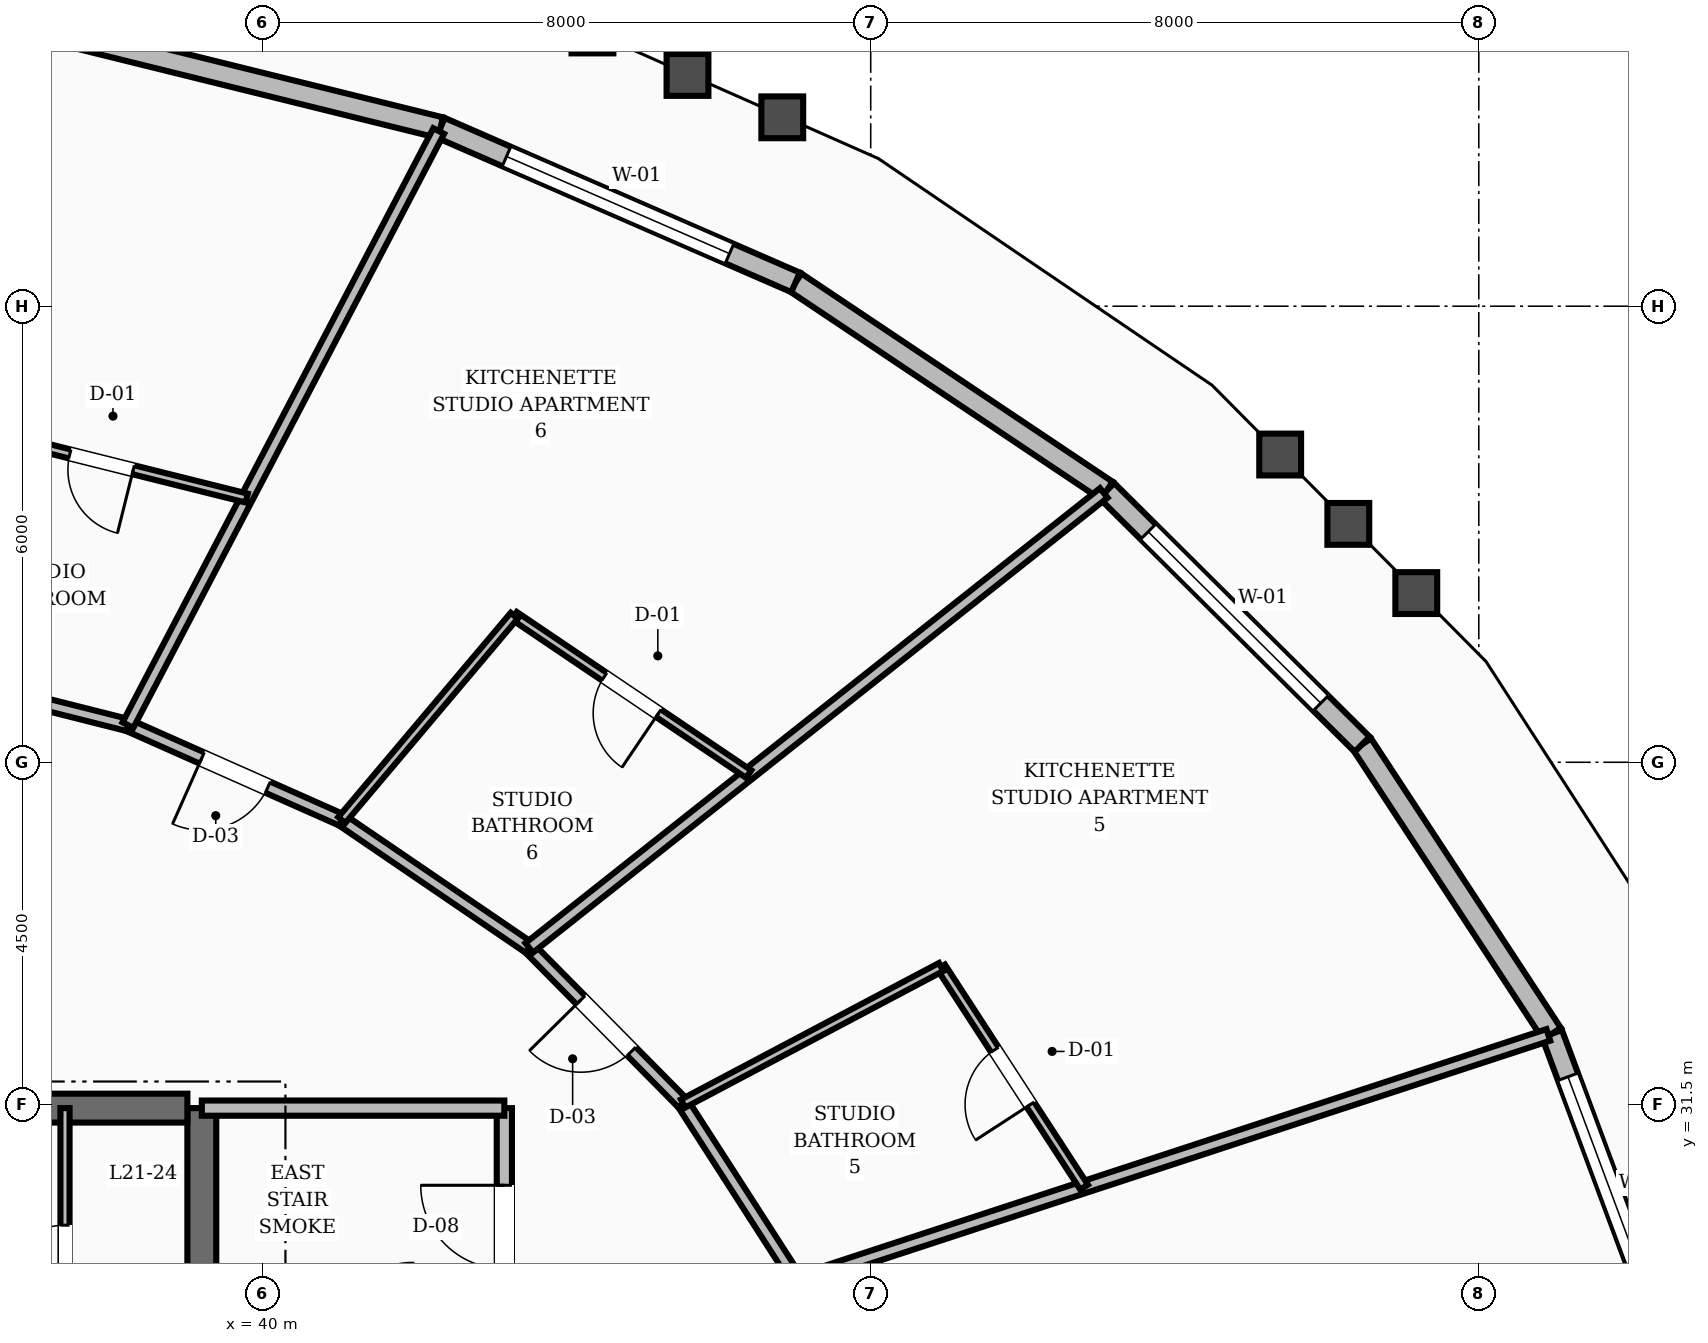
"""IFC4 building model, lengths in metres.
Left out: names, types, materials, properties, quantities, classifications, styles, units other than length and angle.
Written with IfcOpenShell. Run it as: python <this file> out.ifc"""

import sys

from ifc_helpers import new_model, si_unit, direction, frame, frame_2d, origin, place, context, subcontext, project, spatial, rectangle, extrude, element, fill, save


model = new_model("IFC4")
c1 = context("Model", 3, precision=1e-05, world=origin(), true_north=direction((0.0, 1.0)))
c2 = subcontext(c1, "Body", "Model", "MODEL_VIEW")
j1 = project(units=[si_unit("LENGTHUNIT", "METRE"), si_unit("PLANEANGLEUNIT", "RADIAN")], contexts=[c1])
p1 = place(None, origin())
s1 = spatial("IfcSite", under=j1, at=p1, CompositionType="ELEMENT")
p2 = place(p1, origin())
s2 = spatial("IfcBuilding", under=s1, at=p2, CompositionType="ELEMENT")
p3 = place(p2, frame((0.0, 0.0, 84.4)))
s3 = spatial("IfcBuildingStorey", under=s2, at=p3, CompositionType="ELEMENT", Elevation=84.4)
p4 = place(p3, frame((39.2, 25.15, 0.0), z_axis=(0.0, 0.0, 1.0), x_axis=(0.0, 1.0, 0.0)))
e1 = element("IfcWall", 1, at=p4, inside=s3, PredefinedType="SHEAR", context=c2, shape_type="SweptSolid", body=[
    extrude(rectangle(XDim=6.3, YDim=0.38, at=frame_2d((3.15, 0.0))), origin(), (0.0, 0.0, 1.0), 3.6),
])
p5 = place(p3, frame((35.8, 31.45, 0.0), z_axis=(0.0, 0.0, 1.0), x_axis=(1.0, 0.0, 0.0)))
e2 = element("IfcWall", 2, at=p5, inside=s3, PredefinedType="SHEAR", context=c2, shape_type="SweptSolid", body=[
    extrude(rectangle(XDim=3.21, YDim=0.38, at=frame_2d((1.605, 0.0))), origin(), (0.0, 0.0, 1.0), 3.6),
])
p6 = place(p5, frame((0.3, 0.0, 0.0)))
e3 = element("IfcOpeningElement", 3, at=p6, cuts=e2, PredefinedType="OPENING", context=c2, shape_type="SweptSolid", body=[
    extrude(rectangle(XDim=1.1, YDim=2.1, at=frame_2d((0.55, 1.05))), frame((0.0, 0.2, 0.0), z_axis=(0.0, -1.0, 0.0), x_axis=(1.0, 0.0, 0.0)), (0.0, 0.0, 1.0), 0.4),
])
p7 = place(p3, frame((58.5, 28.297, 0.0), z_axis=(0.0, 0.0, 1.0), x_axis=(-0.348719005739, 0.937227323031, 0.0)))
e4 = element("IfcWall", 4, at=p7, inside=s3, PredefinedType="STANDARD", context=c2, shape_type="SweptSolid", body=[
    extrude(rectangle(XDim=4.409, YDim=0.28, at=frame_2d((2.204, 0.0))), origin(), (0.0, 0.0, 1.0), 2.71),
])
p8 = place(p7, frame((0.604, 0.0, 0.8)))
e5 = element("IfcOpeningElement", 5, at=p8, cuts=e4, PredefinedType="OPENING", context=c2, shape_type="SweptSolid", body=[
    extrude(rectangle(XDim=3.2, YDim=1.65, at=frame_2d((1.6, 0.825))), frame((0.0, 0.15, 0.0), z_axis=(0.0, -1.0, 0.0), x_axis=(1.0, 0.0, 0.0)), (0.0, 0.0, 1.0), 0.3),
])
p9 = place(p3, frame((56.962, 32.429, 0.0), z_axis=(0.0, 0.0, 1.0), x_axis=(-0.548336678248, 0.836257668, 0.0)))
e6 = element("IfcWall", 6, at=p9, inside=s3, PredefinedType="STANDARD", context=c2, shape_type="SweptSolid", body=[
    extrude(rectangle(XDim=4.553, YDim=0.28, at=frame_2d((2.277, 0.0))), origin(), (0.0, 0.0, 1.0), 2.71),
])
p10 = place(p3, frame((54.466, 36.237, 0.0), z_axis=(0.0, 0.0, 1.0), x_axis=(-0.709499676925, 0.704705760189, 0.0)))
e7 = element("IfcWall", 7, at=p10, inside=s3, PredefinedType="STANDARD", context=c2, shape_type="SweptSolid", body=[
    extrude(rectangle(XDim=4.736, YDim=0.28, at=frame_2d((2.368, 0.0))), origin(), (0.0, 0.0, 1.0), 2.71),
])
p11 = place(p10, frame((0.768, 0.0, 0.8)))
e8 = element("IfcOpeningElement", 8, at=p11, cuts=e7, PredefinedType="OPENING", context=c2, shape_type="SweptSolid", body=[
    extrude(rectangle(XDim=3.2, YDim=1.65, at=frame_2d((1.6, 0.825))), frame((0.0, 0.15, 0.0), z_axis=(0.0, -1.0, 0.0), x_axis=(1.0, 0.0, 0.0)), (0.0, 0.0, 1.0), 0.3),
])
p12 = place(p3, frame((51.105, 39.574, 0.0), z_axis=(0.0, 0.0, 1.0), x_axis=(-0.831134194268, 0.55607189384, 0.0)))
e9 = element("IfcWall", 9, at=p12, inside=s3, PredefinedType="STANDARD", context=c2, shape_type="SweptSolid", body=[
    extrude(rectangle(XDim=4.926, YDim=0.28, at=frame_2d((2.463, 0.0))), origin(), (0.0, 0.0, 1.0), 2.71),
])
p13 = place(p3, frame((47.011, 42.313, 0.0), z_axis=(0.0, 0.0, 1.0), x_axis=(-0.916774249717, 0.399405777445, 0.0)))
e10 = element("IfcWall", 10, at=p13, inside=s3, PredefinedType="STANDARD", context=c2, shape_type="SweptSolid", body=[
    extrude(rectangle(XDim=5.095, YDim=0.28, at=frame_2d((2.548, 0.0))), origin(), (0.0, 0.0, 1.0), 2.71),
])
p14 = place(p13, frame((0.948, 0.0, 0.8)))
e11 = element("IfcOpeningElement", 11, at=p14, cuts=e10, PredefinedType="OPENING", context=c2, shape_type="SweptSolid", body=[
    extrude(rectangle(XDim=3.2, YDim=1.65, at=frame_2d((1.6, 0.825))), frame((0.0, 0.15, 0.0), z_axis=(0.0, -1.0, 0.0), x_axis=(1.0, 0.0, 0.0)), (0.0, 0.0, 1.0), 0.3),
])
p15 = place(p3, frame((42.34, 44.349, 0.0), z_axis=(0.0, 0.0, 1.0), x_axis=(-0.970758207565, 0.240059372749, 0.0)))
e12 = element("IfcWall", 12, at=p15, inside=s3, PredefinedType="STANDARD", context=c2, shape_type="SweptSolid", body=[
    extrude(rectangle(XDim=5.221, YDim=0.28, at=frame_2d((2.611, 0.0))), origin(), (0.0, 0.0, 1.0), 2.71),
])
p16 = place(p3, frame((43.18, 28.32, 0.0), z_axis=(0.0, 0.0, 1.0), x_axis=(0.0, 1.0, 0.0)))
e13 = element("IfcWall", 13, at=p16, inside=s3, PredefinedType="SOLIDWALL", context=c2, shape_type="SweptSolid", body=[
    extrude(rectangle(XDim=3.13, YDim=0.2, at=frame_2d((1.565, 0.0))), origin(), (0.0, 0.0, 1.0), 2.71),
])
p17 = place(p16, frame((1.015, 0.0, 0.0)))
e14 = element("IfcOpeningElement", 14, at=p17, cuts=e13, PredefinedType="OPENING", context=c2, shape_type="SweptSolid", body=[
    extrude(rectangle(XDim=1.1, YDim=2.1, at=frame_2d((0.55, 1.05))), frame((0.0, 0.11, 0.0), z_axis=(0.0, -1.0, 0.0), x_axis=(1.0, 0.0, 0.0)), (0.0, 0.0, 1.0), 0.22),
])
p18 = place(p3, frame((39.2, 31.45, 0.0), z_axis=(0.0, 0.0, 1.0), x_axis=(1.0, 0.0, 0.0)))
e15 = element("IfcWall", 15, at=p18, inside=s3, PredefinedType="SOLIDWALL", context=c2, shape_type="SweptSolid", body=[
    extrude(rectangle(XDim=3.98, YDim=0.2, at=frame_2d((1.99, 0.0))), origin(), (0.0, 0.0, 1.0), 2.71),
])
p19 = place(p3, frame((37.4, 25.25, 0.0), z_axis=(0.0, 0.0, 1.0), x_axis=(0.0, 1.0, 0.0)))
e16 = element("IfcWall", 16, at=p19, inside=s3, PredefinedType="PARTITIONING", context=c2, shape_type="SweptSolid", body=[
    extrude(rectangle(XDim=6.2, YDim=0.12, at=frame_2d((3.1, 0.0))), origin(), (0.0, 0.0, 1.0), 2.71),
])
p20 = place(p19, frame((0.8, 0.0, 0.0)))
e17 = element("IfcOpeningElement", 17, at=p20, cuts=e16, PredefinedType="OPENING", context=c2, shape_type="SweptSolid", body=[
    extrude(rectangle(XDim=0.86, YDim=2.1, at=frame_2d((0.43, 1.05))), frame((0.0, 0.07, 0.0), z_axis=(0.0, -1.0, 0.0), x_axis=(1.0, 0.0, 0.0)), (0.0, 0.0, 1.0), 0.14),
])
p21 = place(p19, frame((3.8, 0.0, 0.0)))
e18 = element("IfcOpeningElement", 18, at=p21, cuts=e16, PredefinedType="OPENING", context=c2, shape_type="SweptSolid", body=[
    extrude(rectangle(XDim=0.86, YDim=2.1, at=frame_2d((0.43, 1.05))), frame((0.0, 0.07, 0.0), z_axis=(0.0, -1.0, 0.0), x_axis=(1.0, 0.0, 0.0)), (0.0, 0.0, 1.0), 0.14),
])
p22 = place(p3, frame((47.035, 29.173, 0.0), z_axis=(0.0, 0.0, 1.0), x_axis=(-0.541126045017, 0.840941498206, 0.0)))
e19 = element("IfcWall", 19, at=p22, inside=s3, PredefinedType="SOLIDWALL", context=c2, shape_type="SweptSolid", body=[
    extrude(rectangle(XDim=2.779, YDim=0.16, at=frame_2d((1.39, 0.0))), origin(), (0.0, 0.0, 1.0), 2.71),
])
p23 = place(p3, frame((45.531, 31.51, 0.0), z_axis=(0.0, 0.0, 1.0), x_axis=(-0.702811997, 0.711375636969, 0.0)))
e20 = element("IfcWall", 20, at=p23, inside=s3, PredefinedType="SOLIDWALL", context=c2, shape_type="SweptSolid", body=[
    extrude(rectangle(XDim=2.879, YDim=0.16, at=frame_2d((1.44, 0.0))), origin(), (0.0, 0.0, 1.0), 2.71),
])
p24 = place(p23, frame((0.965, 0.0, 0.0)))
e21 = element("IfcOpeningElement", 21, at=p24, cuts=e20, PredefinedType="OPENING", context=c2, shape_type="SweptSolid", body=[
    extrude(rectangle(XDim=0.95, YDim=2.1, at=frame_2d((0.475, 1.05))), frame((0.0, 0.09, 0.0), z_axis=(0.0, -1.0, 0.0), x_axis=(1.0, 0.0, 0.0)), (0.0, 0.0, 1.0), 0.18),
])
p25 = place(p3, frame((43.508, 33.559, 0.0), z_axis=(0.0, 0.0, 1.0), x_axis=(-0.826293096206, 0.56324037423, 0.0)))
e22 = element("IfcWall", 22, at=p25, inside=s3, PredefinedType="SOLIDWALL", context=c2, shape_type="SweptSolid", body=[
    extrude(rectangle(XDim=2.985, YDim=0.16, at=frame_2d((1.492, 0.0))), origin(), (0.0, 0.0, 1.0), 2.71),
])
p26 = place(p3, frame((41.041, 35.24, 0.0), z_axis=(0.0, 0.0, 1.0), x_axis=(-0.913952123493, 0.405822024984, 0.0)))
e23 = element("IfcWall", 23, at=p26, inside=s3, PredefinedType="SOLIDWALL", context=c2, shape_type="SweptSolid", body=[
    extrude(rectangle(XDim=3.078, YDim=0.16, at=frame_2d((1.539, 0.0))), origin(), (0.0, 0.0, 1.0), 2.71),
])
p27 = place(p26, frame((1.064, 0.0, 0.0)))
e24 = element("IfcOpeningElement", 24, at=p27, cuts=e23, PredefinedType="OPENING", context=c2, shape_type="SweptSolid", body=[
    extrude(rectangle(XDim=0.95, YDim=2.1, at=frame_2d((0.475, 1.05))), frame((0.0, 0.09, 0.0), z_axis=(0.0, -1.0, 0.0), x_axis=(1.0, 0.0, 0.0)), (0.0, 0.0, 1.0), 0.18),
])
p28 = place(p3, frame((38.228, 36.489, 0.0), z_axis=(0.0, 0.0, 1.0), x_axis=(-0.969689238064, 0.244341526521, 0.0)))
e25 = element("IfcWall", 25, at=p28, inside=s3, PredefinedType="SOLIDWALL", context=c2, shape_type="SweptSolid", body=[
    extrude(rectangle(XDim=3.148, YDim=0.16, at=frame_2d((1.574, 0.0))), origin(), (0.0, 0.0, 1.0), 2.71),
])
p29 = place(p3, frame((47.035, 29.173, 0.0), z_axis=(0.0, 0.0, 1.0), x_axis=(0.95020777267, 0.311617054664, 0.0)))
e26 = element("IfcWall", 26, at=p29, inside=s3, PredefinedType="SOLIDWALL", context=c2, shape_type="SweptSolid", body=[
    extrude(rectangle(XDim=10.397, YDim=0.16, at=frame_2d((5.199, 0.0))), origin(), (0.0, 0.0, 1.0), 2.71),
])
p30 = place(p3, frame((50.808, 30.41, 0.0), z_axis=(0.0, 0.0, 1.0), x_axis=(-0.544774633125, 0.838582493917, 0.0)))
e27 = element("IfcWall", 27, at=p30, inside=s3, PredefinedType="PARTITIONING", context=c2, shape_type="SweptSolid", body=[
    extrude(rectangle(XDim=3.453, YDim=0.12, at=frame_2d((1.727, 0.0))), origin(), (0.0, 0.0, 1.0), 2.71),
])
p31 = place(p30, frame((1.297, 0.0, 0.0)))
e28 = element("IfcOpeningElement", 28, at=p31, cuts=e27, PredefinedType="OPENING", context=c2, shape_type="SweptSolid", body=[
    extrude(rectangle(XDim=0.86, YDim=2.1, at=frame_2d((0.43, 1.05))), frame((0.0, 0.07, 0.0), z_axis=(0.0, -1.0, 0.0), x_axis=(1.0, 0.0, 0.0)), (0.0, 0.0, 1.0), 0.14),
])
p32 = place(p3, frame((45.531, 31.51, 0.0), z_axis=(0.0, 0.0, 1.0), x_axis=(0.883945577966, 0.467589793723, 0.0)))
e29 = element("IfcWall", 29, at=p32, inside=s3, PredefinedType="PARTITIONING", context=c2, shape_type="SweptSolid", body=[
    extrude(rectangle(XDim=3.841, YDim=0.12, at=frame_2d((1.92, 0.0))), origin(), (0.0, 0.0, 1.0), 2.71),
])
p33 = place(p3, frame((43.508, 33.559, 0.0), z_axis=(0.0, 0.0, 1.0), x_axis=(0.784008851618, 0.620749644047, 0.0)))
e30 = element("IfcWall", 30, at=p33, inside=s3, PredefinedType="SOLIDWALL", context=c2, shape_type="SweptSolid", body=[
    extrude(rectangle(XDim=9.641, YDim=0.16, at=frame_2d((4.82, 0.0))), origin(), (0.0, 0.0, 1.0), 2.71),
])
p34 = place(p3, frame((46.395, 35.844, 0.0), z_axis=(0.0, 0.0, 1.0), x_axis=(-0.82873612878, 0.559639552618, 0.0)))
e31 = element("IfcWall", 31, at=p34, inside=s3, PredefinedType="PARTITIONING", context=c2, shape_type="SweptSolid", body=[
    extrude(rectangle(XDim=3.722, YDim=0.12, at=frame_2d((1.861, 0.0))), origin(), (0.0, 0.0, 1.0), 2.71),
])
p35 = place(p34, frame((1.431, 0.0, 0.0)))
e32 = element("IfcOpeningElement", 32, at=p35, cuts=e31, PredefinedType="OPENING", context=c2, shape_type="SweptSolid", body=[
    extrude(rectangle(XDim=0.86, YDim=2.1, at=frame_2d((0.43, 1.05))), frame((0.0, 0.07, 0.0), z_axis=(0.0, -1.0, 0.0), x_axis=(1.0, 0.0, 0.0)), (0.0, 0.0, 1.0), 0.14),
])
p36 = place(p3, frame((41.041, 35.24, 0.0), z_axis=(0.0, 0.0, 1.0), x_axis=(0.644964696284, 0.764212366131, 0.0)))
e33 = element("IfcWall", 33, at=p36, inside=s3, PredefinedType="PARTITIONING", context=c2, shape_type="SweptSolid", body=[
    extrude(rectangle(XDim=3.517, YDim=0.12, at=frame_2d((1.759, 0.0))), origin(), (0.0, 0.0, 1.0), 2.71),
])
p37 = place(p3, frame((38.228, 36.489, 0.0), z_axis=(0.0, 0.0, 1.0), x_axis=(0.463546676058, 0.886072502178, 0.0)))
e34 = element("IfcWall", 34, at=p37, inside=s3, PredefinedType="SOLIDWALL", context=c2, shape_type="SweptSolid", body=[
    extrude(rectangle(XDim=8.82, YDim=0.16, at=frame_2d((4.41, 0.0))), origin(), (0.0, 0.0, 1.0), 2.71),
])
p38 = place(p3, frame((39.79, 39.476, 0.0), z_axis=(0.0, 0.0, 1.0), x_axis=(-0.970222716949, 0.242214532009, 0.0)))
e35 = element("IfcWall", 35, at=p38, inside=s3, PredefinedType="PARTITIONING", context=c2, shape_type="SweptSolid", body=[
    extrude(rectangle(XDim=3.936, YDim=0.12, at=frame_2d((1.968, 0.0))), origin(), (0.0, 0.0, 1.0), 2.71),
])
p39 = place(p38, frame((1.538, 0.0, 0.0)))
e36 = element("IfcOpeningElement", 36, at=p39, cuts=e35, PredefinedType="OPENING", context=c2, shape_type="SweptSolid", body=[
    extrude(rectangle(XDim=0.86, YDim=2.1, at=frame_2d((0.43, 1.05))), frame((0.0, 0.07, 0.0), z_axis=(0.0, -1.0, 0.0), x_axis=(1.0, 0.0, 0.0)), (0.0, 0.0, 1.0), 0.14),
])
p40 = place(p8, origin())
e37 = element("IfcWindow", 37, at=p40, inside=s3, PartitioningType="SINGLE_PANEL", PredefinedType="WINDOW", context=c2, shape_type="SweptSolid", body=[
    extrude(rectangle(XDim=3.2, YDim=1.65, at=frame_2d((1.6, 0.825))), frame((0.0, 0.03, 0.0), z_axis=(0.0, -1.0, 0.0), x_axis=(1.0, 0.0, 0.0)), (0.0, 0.0, 1.0), 0.06),
])
fill(e5, e37)
p41 = place(p11, origin())
e38 = element("IfcWindow", 38, at=p41, inside=s3, PartitioningType="SINGLE_PANEL", PredefinedType="WINDOW", context=c2, shape_type="SweptSolid", body=[
    extrude(rectangle(XDim=3.2, YDim=1.65, at=frame_2d((1.6, 0.825))), frame((0.0, 0.03, 0.0), z_axis=(0.0, -1.0, 0.0), x_axis=(1.0, 0.0, 0.0)), (0.0, 0.0, 1.0), 0.06),
])
fill(e8, e38)
p42 = place(p14, origin())
e39 = element("IfcWindow", 39, at=p42, inside=s3, PartitioningType="SINGLE_PANEL", PredefinedType="WINDOW", context=c2, shape_type="SweptSolid", body=[
    extrude(rectangle(XDim=3.2, YDim=1.65, at=frame_2d((1.6, 0.825))), frame((0.0, 0.03, 0.0), z_axis=(0.0, -1.0, 0.0), x_axis=(1.0, 0.0, 0.0)), (0.0, 0.0, 1.0), 0.06),
])
fill(e11, e39)
p43 = place(p17, origin())
e40 = element("IfcDoor", 40, at=p43, inside=s3, OperationType="SINGLE_SWING_RIGHT", PredefinedType="DOOR", context=c2, shape_type="SweptSolid", body=[
    extrude(rectangle(XDim=1.1, YDim=2.1, at=frame_2d((0.55, 1.05))), frame((0.0, 0.025, 0.0), z_axis=(0.0, -1.0, 0.0), x_axis=(1.0, 0.0, 0.0)), (0.0, 0.0, 1.0), 0.05),
])
fill(e14, e40)
p44 = place(p21, origin())
e41 = element("IfcDoor", 41, at=p44, inside=s3, OperationType="SINGLE_SWING_LEFT", PredefinedType="DOOR", context=c2, shape_type="SweptSolid", body=[
    extrude(rectangle(XDim=0.86, YDim=2.1, at=frame_2d((0.43, 1.05))), frame((0.0, 0.025, 0.0), z_axis=(0.0, -1.0, 0.0), x_axis=(1.0, 0.0, 0.0)), (0.0, 0.0, 1.0), 0.05),
])
fill(e18, e41)
p45 = place(p31, origin())
e42 = element("IfcDoor", 42, at=p45, inside=s3, OperationType="SINGLE_SWING_LEFT", PredefinedType="DOOR", context=c2, shape_type="SweptSolid", body=[
    extrude(rectangle(XDim=0.86, YDim=2.1, at=frame_2d((0.43, 1.05))), frame((0.0, 0.025, 0.0), z_axis=(0.0, -1.0, 0.0), x_axis=(1.0, 0.0, 0.0)), (0.0, 0.0, 1.0), 0.05),
])
fill(e28, e42)
p46 = place(p24, origin())
e43 = element("IfcDoor", 43, at=p46, inside=s3, OperationType="SINGLE_SWING_RIGHT", PredefinedType="DOOR", context=c2, shape_type="SweptSolid", body=[
    extrude(rectangle(XDim=0.95, YDim=2.1, at=frame_2d((0.475, 1.05))), frame((0.0, 0.025, 0.0), z_axis=(0.0, -1.0, 0.0), x_axis=(1.0, 0.0, 0.0)), (0.0, 0.0, 1.0), 0.05),
])
fill(e21, e43)
p47 = place(p35, origin())
e44 = element("IfcDoor", 44, at=p47, inside=s3, OperationType="SINGLE_SWING_LEFT", PredefinedType="DOOR", context=c2, shape_type="SweptSolid", body=[
    extrude(rectangle(XDim=0.86, YDim=2.1, at=frame_2d((0.43, 1.05))), frame((0.0, 0.025, 0.0), z_axis=(0.0, -1.0, 0.0), x_axis=(1.0, 0.0, 0.0)), (0.0, 0.0, 1.0), 0.05),
])
fill(e32, e44)
p48 = place(p27, origin())
e45 = element("IfcDoor", 45, at=p48, inside=s3, OperationType="SINGLE_SWING_RIGHT", PredefinedType="DOOR", context=c2, shape_type="SweptSolid", body=[
    extrude(rectangle(XDim=0.95, YDim=2.1, at=frame_2d((0.475, 1.05))), frame((0.0, 0.025, 0.0), z_axis=(0.0, -1.0, 0.0), x_axis=(1.0, 0.0, 0.0)), (0.0, 0.0, 1.0), 0.05),
])
fill(e24, e45)
p49 = place(p39, origin())
e46 = element("IfcDoor", 46, at=p49, inside=s3, OperationType="SINGLE_SWING_LEFT", PredefinedType="DOOR", context=c2, shape_type="SweptSolid", body=[
    extrude(rectangle(XDim=0.86, YDim=2.1, at=frame_2d((0.43, 1.05))), frame((0.0, 0.025, 0.0), z_axis=(0.0, -1.0, 0.0), x_axis=(1.0, 0.0, 0.0)), (0.0, 0.0, 1.0), 0.05),
])
fill(e36, e46)
save(model, sys.argv[1])
